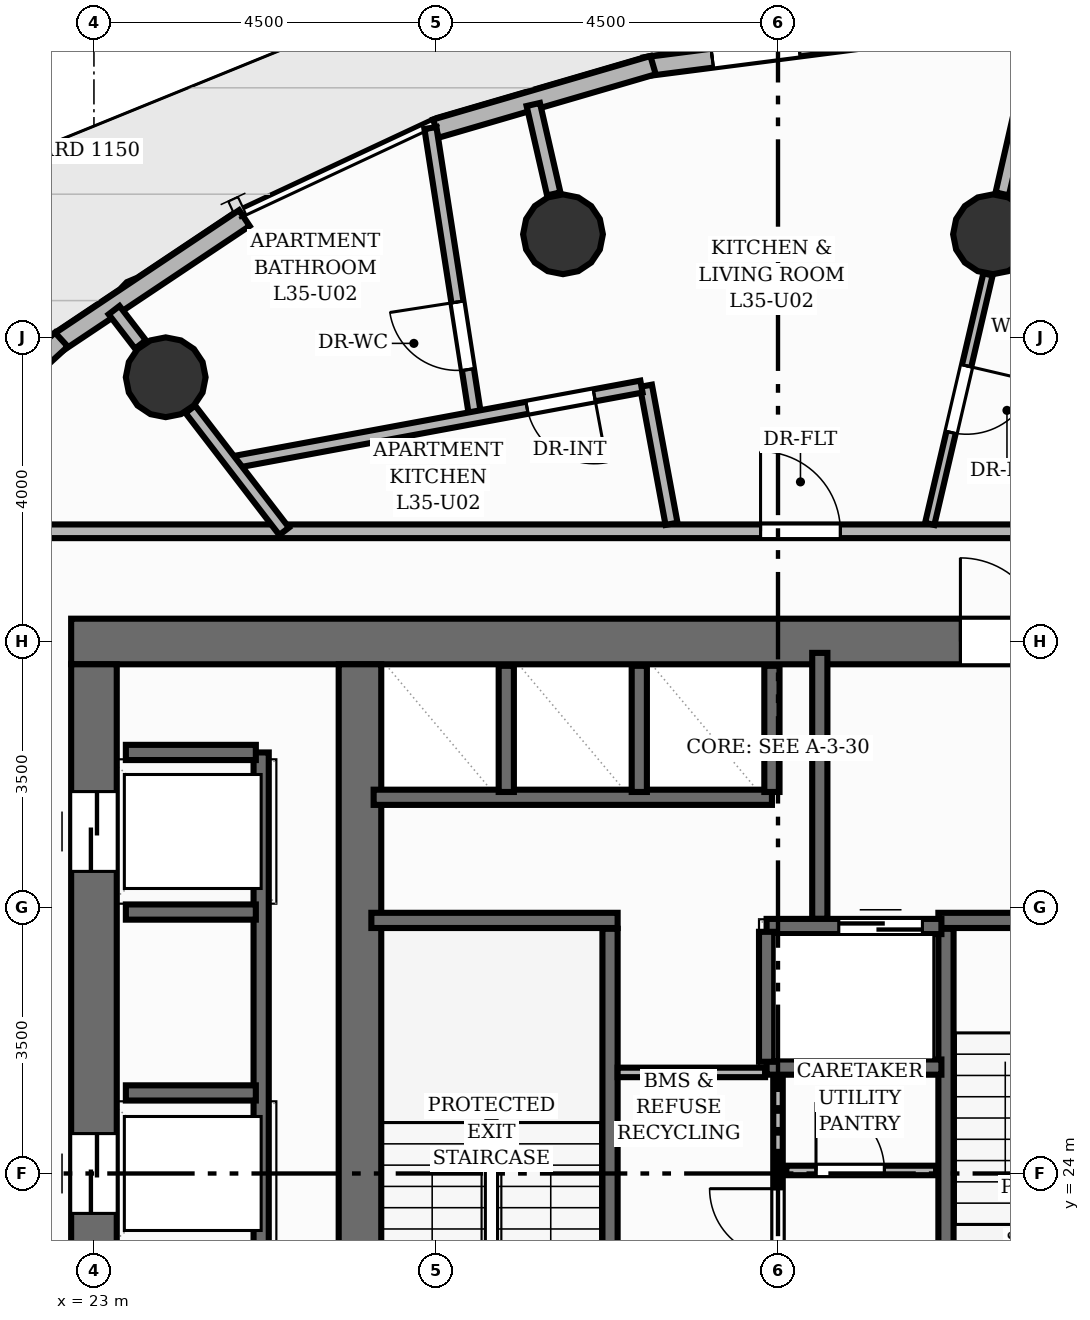
"""IFC4 building model, lengths in metres.
Left out: names, types, materials, properties, quantities, classifications, styles, units other than length and angle.
Written with IfcOpenShell. Run it as: python <this file> out.ifc"""

import sys

from ifc_helpers import new_model, si_unit, direction, frame, frame_2d, origin, origin_2d, place, context, subcontext, project, spatial, rectangle, circle, extrude, element, fill, save


model = new_model("IFC4")
c1 = context("Model", 3, precision=1e-05, world=origin(), true_north=direction((0.0, 1.0)))
c2 = subcontext(c1, "Body", "Model", "MODEL_VIEW")
j1 = project(units=[si_unit("LENGTHUNIT", "METRE"), si_unit("PLANEANGLEUNIT", "RADIAN")], contexts=[c1])
p1 = place(None, origin())
s1 = spatial("IfcSite", under=j1, at=p1, CompositionType="ELEMENT")
p2 = place(p1, origin())
s2 = spatial("IfcBuilding", under=s1, at=p2, CompositionType="ELEMENT")
p3 = place(p2, frame((0.0, 0.0, 120.16)))
s3 = spatial("IfcBuildingStorey", under=s2, at=p3, CompositionType="ELEMENT", Elevation=120.16)
p4 = place(p3, frame((22.7, 31.0, 0.0), z_axis=(0.0, 0.0, 1.0), x_axis=(1.0, 0.0, 0.0)))
e1 = element("IfcWall", 1, at=p4, inside=s3, PredefinedType="SHEAR", context=c2, shape_type="SweptSolid", body=[
    extrude(rectangle(XDim=18.6, YDim=0.6, at=frame_2d((9.3, 0.0))), origin(), (0.0, 0.0, 1.0), 3.2),
])
p5 = place(p4, frame((11.7, 0.0, 0.0)))
e2 = element("IfcOpeningElement", 2, at=p5, cuts=e1, PredefinedType="OPENING", context=c2, shape_type="SweptSolid", body=[
    extrude(rectangle(XDim=1.1, YDim=2.15, at=frame_2d((0.55, 1.075))), frame((0.0, 0.31, 0.0), z_axis=(0.0, -1.0, 0.0), x_axis=(1.0, 0.0, 0.0)), (0.0, 0.0, 1.0), 0.62),
])
p6 = place(p3, frame((23.0, 17.3, 0.0), z_axis=(0.0, 0.0, 1.0), x_axis=(0.0, 1.0, 0.0)))
e3 = element("IfcWall", 3, at=p6, inside=s3, PredefinedType="SHEAR", context=c2, shape_type="SweptSolid", body=[
    extrude(rectangle(XDim=13.4, YDim=0.6, at=frame_2d((6.7, 0.0))), origin(), (0.0, 0.0, 1.0), 3.2),
])
p7 = place(p6, frame((1.675, 0.0, 0.0)))
e4 = element("IfcOpeningElement", 4, at=p7, cuts=e3, PredefinedType="OPENING", context=c2, shape_type="SweptSolid", body=[
    extrude(rectangle(XDim=1.05, YDim=2.15, at=frame_2d((0.525, 1.075))), frame((0.0, 0.31, 0.0), z_axis=(0.0, -1.0, 0.0), x_axis=(1.0, 0.0, 0.0)), (0.0, 0.0, 1.0), 0.62),
])
p8 = place(p6, frame((6.175, 0.0, 0.0)))
e5 = element("IfcOpeningElement", 5, at=p8, cuts=e3, PredefinedType="OPENING", context=c2, shape_type="SweptSolid", body=[
    extrude(rectangle(XDim=1.05, YDim=2.15, at=frame_2d((0.525, 1.075))), frame((0.0, 0.31, 0.0), z_axis=(0.0, -1.0, 0.0), x_axis=(1.0, 0.0, 0.0)), (0.0, 0.0, 1.0), 0.62),
])
p9 = place(p6, frame((10.675, 0.0, 0.0)))
e6 = element("IfcOpeningElement", 6, at=p9, cuts=e3, PredefinedType="OPENING", context=c2, shape_type="SweptSolid", body=[
    extrude(rectangle(XDim=1.05, YDim=2.15, at=frame_2d((0.525, 1.075))), frame((0.0, 0.31, 0.0), z_axis=(0.0, -1.0, 0.0), x_axis=(1.0, 0.0, 0.0)), (0.0, 0.0, 1.0), 0.62),
])
p10 = place(p3, frame((26.5, 17.3, 0.0), z_axis=(0.0, 0.0, 1.0), x_axis=(0.0, 1.0, 0.0)))
e7 = element("IfcWall", 7, at=p10, inside=s3, PredefinedType="SHEAR", context=c2, shape_type="SweptSolid", body=[
    extrude(rectangle(XDim=13.4, YDim=0.56, at=frame_2d((6.7, 0.0))), origin(), (0.0, 0.0, 1.0), 3.2),
])
for number, where, z_axis, x_axis in (
    (8, (34.829, 36.358, 0.0), (0.0, 0.0, 1.0), (1.0, 0.0, 0.0)),
    (9, (29.171, 36.358, 0.0), (0.0, 0.0, 1.0), (1.0, 0.0, 0.0)),
    (10, (23.944, 34.477, 0.0), (0.0, 0.0, 1.0), (1.0, 0.0, 0.0)),
):
    element("IfcColumn", number, at=place(p3, frame(where, z_axis=z_axis, x_axis=x_axis)), inside=s3, PredefinedType="COLUMN", context=c2, shape_type="SweptSolid", body=[
        extrude(circle(Radius=0.525, at=origin_2d()), origin(), (0.0, 0.0, 1.0), 3.2),
    ])
p11 = place(p3, frame((30.25, 38.561, 0.0), z_axis=(0.0, 0.0, 1.0), x_axis=(0.991825107288, 0.1276046886, 0.0)))
e11 = element("IfcWall", 11, at=p11, inside=s3, PredefinedType="SOLIDWALL", context=c2, shape_type="SweptSolid", body=[
    extrude(rectangle(XDim=2.937, YDim=0.25, at=frame_2d((1.468, 0.0))), origin(), (0.0, 0.0, 1.0), 2.96),
])
p12 = place(p11, frame((0.893, 0.0, 0.0)))
e12 = element("IfcOpeningElement", 12, at=p12, cuts=e11, PredefinedType="OPENING", context=c2, shape_type="SweptSolid", body=[
    extrude(rectangle(XDim=1.15, YDim=2.2, at=frame_2d((0.575, 1.1))), frame((0.0, 0.135, 0.0), z_axis=(0.0, -1.0, 0.0), x_axis=(1.0, 0.0, 0.0)), (0.0, 0.0, 1.0), 0.27),
])
p13 = place(p3, frame((27.499, 37.749, 0.0), z_axis=(0.0, 0.0, 1.0), x_axis=(0.95988234126, 0.280403086532, 0.0)))
e13 = element("IfcWall", 13, at=p13, inside=s3, PredefinedType="SOLIDWALL", context=c2, shape_type="SweptSolid", body=[
    extrude(rectangle(XDim=2.977, YDim=0.25, at=frame_2d((1.488, 0.0))), origin(), (0.0, 0.0, 1.0), 2.96),
])
p14 = place(p3, frame((22.486, 34.906, 0.0), z_axis=(0.0, 0.0, 1.0), x_axis=(0.831523781892, 0.555489153943, 0.0)))
e14 = element("IfcWall", 14, at=p14, inside=s3, PredefinedType="SOLIDWALL", context=c2, shape_type="SweptSolid", body=[
    extrude(rectangle(XDim=2.998, YDim=0.25, at=frame_2d((1.499, 0.0))), origin(), (0.0, 0.0, 1.0), 2.96),
])
p15 = place(p3, frame((20.377, 32.961, 0.0), z_axis=(0.0, 0.0, 1.0), x_axis=(0.737072437991, 0.675813747384, 0.0)))
e15 = element("IfcWall", 15, at=p15, inside=s3, PredefinedType="SOLIDWALL", context=c2, shape_type="SweptSolid", body=[
    extrude(rectangle(XDim=2.977, YDim=0.25, at=frame_2d((1.489, 0.0))), origin(), (0.0, 0.0, 1.0), 2.96),
])
p16 = place(p15, frame((0.664, 0.0, 0.85)))
e16 = element("IfcOpeningElement", 16, at=p16, cuts=e15, PredefinedType="OPENING", context=c2, shape_type="SweptSolid", body=[
    extrude(rectangle(XDim=1.65, YDim=1.55, at=frame_2d((0.825, 0.775))), frame((0.0, 0.135, 0.0), z_axis=(0.0, -1.0, 0.0), x_axis=(1.0, 0.0, 0.0)), (0.0, 0.0, 1.0), 0.27),
])
p17 = place(p3, frame((29.79, 20.78, 0.0), z_axis=(0.0, 0.0, 1.0), x_axis=(0.0, 1.0, 0.0)))
e17 = element("IfcWall", 17, at=p17, inside=s3, PredefinedType="SHEAR", context=c2, shape_type="SweptSolid", body=[
    extrude(rectangle(XDim=6.44, YDim=0.2, at=frame_2d((3.22, 0.0))), origin(), (0.0, 0.0, 1.0), 3.2),
])
p18 = place(p3, frame((26.65, 27.33, 0.0), z_axis=(0.0, 0.0, 1.0), x_axis=(1.0, 0.0, 0.0)))
e18 = element("IfcWall", 18, at=p18, inside=s3, PredefinedType="SHEAR", context=c2, shape_type="SweptSolid", body=[
    extrude(rectangle(XDim=3.24, YDim=0.2, at=frame_2d((1.62, 0.0))), origin(), (0.0, 0.0, 1.0), 3.2),
])
p19 = place(p3, frame((34.21, 20.78, 0.0), z_axis=(0.0, 0.0, 1.0), x_axis=(0.0, 1.0, 0.0)))
e19 = element("IfcWall", 19, at=p19, inside=s3, PredefinedType="SHEAR", context=c2, shape_type="SweptSolid", body=[
    extrude(rectangle(XDim=6.44, YDim=0.2, at=frame_2d((3.22, 0.0))), origin(), (0.0, 0.0, 1.0), 3.2),
])
p20 = place(p3, frame((34.11, 27.33, 0.0), z_axis=(0.0, 0.0, 1.0), x_axis=(1.0, 0.0, 0.0)))
e20 = element("IfcWall", 20, at=p20, inside=s3, PredefinedType="SHEAR", context=c2, shape_type="SweptSolid", body=[
    extrude(rectangle(XDim=3.24, YDim=0.2, at=frame_2d((1.62, 0.0))), origin(), (0.0, 0.0, 1.0), 3.2),
])
p21 = place(p20, frame((1.135, 0.0, 0.0)))
e21 = element("IfcOpeningElement", 21, at=p21, cuts=e20, PredefinedType="OPENING", context=c2, shape_type="SweptSolid", body=[
    extrude(rectangle(XDim=1.05, YDim=2.15, at=frame_2d((0.525, 1.075))), frame((0.0, 0.11, 0.0), z_axis=(0.0, -1.0, 0.0), x_axis=(1.0, 0.0, 0.0)), (0.0, 0.0, 1.0), 0.22),
])
p22 = place(p3, frame((32.55, 27.35, 0.0), z_axis=(0.0, 0.0, 1.0), x_axis=(0.0, 1.0, 0.0)))
e22 = element("IfcWall", 22, at=p22, inside=s3, PredefinedType="SHEAR", context=c2, shape_type="SweptSolid", body=[
    extrude(rectangle(XDim=3.5, YDim=0.2, at=frame_2d((1.75, 0.0))), origin(), (0.0, 0.0, 1.0), 3.2),
])
p23 = place(p3, frame((31.85, 27.25, 0.0), z_axis=(0.0, 0.0, 1.0), x_axis=(1.0, 0.0, 0.0)))
e23 = element("IfcWall", 23, at=p23, inside=s3, PredefinedType="SHEAR", context=c2, shape_type="SweptSolid", body=[
    extrude(rectangle(XDim=2.3, YDim=0.2, at=frame_2d((1.15, 0.0))), origin(), (0.0, 0.0, 1.0), 3.2),
])
p24 = place(p23, frame((0.95, 0.0, 0.0)))
e24 = element("IfcOpeningElement", 24, at=p24, cuts=e23, PredefinedType="OPENING", context=c2, shape_type="SweptSolid", body=[
    extrude(rectangle(XDim=1.1, YDim=2.15, at=frame_2d((0.55, 1.075))), frame((0.0, 0.11, 0.0), z_axis=(0.0, -1.0, 0.0), x_axis=(1.0, 0.0, 0.0)), (0.0, 0.0, 1.0), 0.22),
])
p25 = place(p3, frame((31.85, 25.4, 0.0), z_axis=(0.0, 0.0, 1.0), x_axis=(1.0, 0.0, 0.0)))
e25 = element("IfcWall", 25, at=p25, inside=s3, PredefinedType="SHEAR", context=c2, shape_type="SweptSolid", body=[
    extrude(rectangle(XDim=2.3, YDim=0.2, at=frame_2d((1.15, 0.0))), origin(), (0.0, 0.0, 1.0), 3.2),
])
p26 = place(p3, frame((31.85, 25.47, 0.0), z_axis=(0.0, 0.0, 1.0), x_axis=(0.0, 1.0, 0.0)))
e26 = element("IfcWall", 26, at=p26, inside=s3, PredefinedType="SHEAR", context=c2, shape_type="SweptSolid", body=[
    extrude(rectangle(XDim=1.71, YDim=0.2, at=frame_2d((0.855, 0.0))), origin(), (0.0, 0.0, 1.0), 3.2),
])
p27 = place(p3, frame((25.2, 18.46, 0.0), z_axis=(0.0, 0.0, 1.0), x_axis=(0.0, 1.0, 0.0)))
e27 = element("IfcWall", 27, at=p27, inside=s3, PredefinedType="SHEAR", context=c2, shape_type="SweptSolid", body=[
    extrude(rectangle(XDim=11.08, YDim=0.2, at=frame_2d((5.54, 0.0))), origin(), (0.0, 0.0, 1.0), 3.2),
])
for number, where, z_axis, x_axis in (
    (28, (23.42, 29.54, 0.0), (0.0, 0.0, 1.0), (1.0, 0.0, 0.0)),
    (29, (23.42, 25.06, 0.0), (0.0, 0.0, 1.0), (1.0, 0.0, 0.0)),
    (30, (23.42, 27.44, 0.0), (0.0, 0.0, 1.0), (1.0, 0.0, 0.0)),
):
    element("IfcWall", number, at=place(p3, frame(where, z_axis=z_axis, x_axis=x_axis)), inside=s3, PredefinedType="SHEAR", context=c2, shape_type="SweptSolid", body=[
        extrude(rectangle(XDim=1.71, YDim=0.2, at=frame_2d((0.855, 0.0))), origin(), (0.0, 0.0, 1.0), 3.2),
    ])
p28 = place(p3, frame((26.68, 28.95, 0.0), z_axis=(0.0, 0.0, 1.0), x_axis=(1.0, 0.0, 0.0)))
e31 = element("IfcWall", 31, at=p28, inside=s3, PredefinedType="SHEAR", context=c2, shape_type="SweptSolid", body=[
    extrude(rectangle(XDim=5.24, YDim=0.2, at=frame_2d((2.62, 0.0))), origin(), (0.0, 0.0, 1.0), 3.2),
])
for number, where, z_axis, x_axis in (
    (32, (31.92, 29.02, 0.0), (0.0, 0.0, 1.0), (0.0, 1.0, 0.0)),
    (33, (28.425, 29.02, 0.0), (0.0, 0.0, 1.0), (0.0, 1.0, 0.0)),
    (34, (30.175, 29.02, 0.0), (0.0, 0.0, 1.0), (0.0, 1.0, 0.0)),
):
    element("IfcWall", number, at=place(p3, frame(where, z_axis=z_axis, x_axis=x_axis)), inside=s3, PredefinedType="SHEAR", context=c2, shape_type="SweptSolid", body=[
        extrude(rectangle(XDim=1.66, YDim=0.2, at=frame_2d((0.83, 0.0))), origin(), (0.0, 0.0, 1.0), 3.2),
    ])
p29 = place(p3, frame((32.0, 22.72, 0.0), z_axis=(0.0, 0.0, 1.0), x_axis=(0.0, 1.0, 0.0)))
e35 = element("IfcWall", 35, at=p29, inside=s3, PredefinedType="PARTITIONING", context=c2, shape_type="SweptSolid", body=[
    extrude(rectangle(XDim=2.52, YDim=0.125, at=frame_2d((1.26, 0.0))), origin(), (0.0, 0.0, 1.0), 2.955),
])
p30 = place(p29, frame((0.18, 0.0, 0.0)))
e36 = element("IfcOpeningElement", 36, at=p30, cuts=e35, PredefinedType="OPENING", context=c2, shape_type="SweptSolid", body=[
    extrude(rectangle(XDim=0.9, YDim=2.1, at=frame_2d((0.45, 1.05))), frame((0.0, 0.073, 0.0), z_axis=(0.0, -1.0, 0.0), x_axis=(1.0, 0.0, 0.0)), (0.0, 0.0, 1.0), 0.145),
])
p31 = place(p3, frame((32.11, 24.04, 0.0), z_axis=(0.0, 0.0, 1.0), x_axis=(1.0, 0.0, 0.0)))
e37 = element("IfcWall", 37, at=p31, inside=s3, PredefinedType="PARTITIONING", context=c2, shape_type="SweptSolid", body=[
    extrude(rectangle(XDim=1.97, YDim=0.125, at=frame_2d((0.985, 0.0))), origin(), (0.0, 0.0, 1.0), 2.955),
])
p32 = place(p31, frame((0.39, 0.0, 0.0)))
e38 = element("IfcOpeningElement", 38, at=p32, cuts=e37, PredefinedType="OPENING", context=c2, shape_type="SweptSolid", body=[
    extrude(rectangle(XDim=0.9, YDim=2.1, at=frame_2d((0.45, 1.05))), frame((0.0, 0.073, 0.0), z_axis=(0.0, -1.0, 0.0), x_axis=(1.0, 0.0, 0.0)), (0.0, 0.0, 1.0), 0.145),
])
p33 = place(p3, frame((29.89, 25.33, 0.0), z_axis=(0.0, 0.0, 1.0), x_axis=(1.0, 0.0, 0.0)))
e39 = element("IfcWall", 39, at=p33, inside=s3, PredefinedType="PARTITIONING", context=c2, shape_type="SweptSolid", body=[
    extrude(rectangle(XDim=1.94, YDim=0.125, at=frame_2d((0.97, 0.0))), origin(), (0.0, 0.0, 1.0), 2.955),
])
p34 = place(p3, frame((34.95, 36.889, 0.0), z_axis=(0.0, 0.0, 1.0), x_axis=(0.22314653936, 0.97478491062, 0.0)))
e40 = element("IfcWall", 40, at=p34, inside=s3, PredefinedType="PARTITIONING", context=c2, shape_type="SweptSolid", body=[
    extrude(rectangle(XDim=1.957, YDim=0.18, at=frame_2d((0.979, 0.0))), origin(), (0.0, 0.0, 1.0), 2.336),
])
p35 = place(p3, frame((29.05, 36.889, 0.0), z_axis=(0.0, 0.0, 1.0), x_axis=(-0.22307190815, 0.974801992096, 0.0)))
e41 = element("IfcWall", 41, at=p35, inside=s3, PredefinedType="PARTITIONING", context=c2, shape_type="SweptSolid", body=[
    extrude(rectangle(XDim=1.207, YDim=0.18, at=frame_2d((0.604, 0.0))), origin(), (0.0, 0.0, 1.0), 2.336),
])
p36 = place(p3, frame((23.612, 34.908, 0.0), z_axis=(0.0, 0.0, 1.0), x_axis=(-0.609627883901, 0.792687733708, 0.0)))
e42 = element("IfcWall", 42, at=p36, inside=s3, PredefinedType="PARTITIONING", context=c2, shape_type="SweptSolid", body=[
    extrude(rectangle(XDim=0.57, YDim=0.18, at=frame_2d((0.285, 0.0))), origin(), (0.0, 0.0, 1.0), 2.336),
])
p37 = place(p3, frame((21.55, 32.45, 0.0), z_axis=(0.0, 0.0, 1.0), x_axis=(1.0, 0.0, 0.0)))
e43 = element("IfcWall", 43, at=p37, inside=s3, PredefinedType="PARTITIONING", context=c2, shape_type="SweptSolid", body=[
    extrude(rectangle(XDim=20.9, YDim=0.18, at=frame_2d((10.45, 0.0))), origin(), (0.0, 0.0, 1.0), 2.955),
])
p38 = place(p37, frame((10.22, 0.0, 0.0)))
e44 = element("IfcOpeningElement", 44, at=p38, cuts=e43, PredefinedType="OPENING", context=c2, shape_type="SweptSolid", body=[
    extrude(rectangle(XDim=1.05, YDim=2.15, at=frame_2d((0.525, 1.075))), frame((0.0, 0.1, 0.0), z_axis=(0.0, -1.0, 0.0), x_axis=(1.0, 0.0, 0.0)), (0.0, 0.0, 1.0), 0.2),
])
p39 = place(p3, frame((28.018, 33.949, 0.0), z_axis=(0.0, 0.0, 1.0), x_axis=(-0.153476019394, 0.988152372598, 0.0)))
e45 = element("IfcWall", 45, at=p39, inside=s3, PredefinedType="PLUMBINGWALL", context=c2, shape_type="SweptSolid", body=[
    extrude(rectangle(XDim=3.853, YDim=0.16, at=frame_2d((1.926, 0.0))), origin(), (0.0, 0.0, 1.0), 2.692),
])
p40 = place(p39, frame((0.636, 0.0, 0.0)))
e46 = element("IfcOpeningElement", 46, at=p40, cuts=e45, PredefinedType="OPENING", context=c2, shape_type="SweptSolid", body=[
    extrude(rectangle(XDim=0.9, YDim=2.1, at=frame_2d((0.45, 1.05))), frame((0.0, 0.09, 0.0), z_axis=(0.0, -1.0, 0.0), x_axis=(1.0, 0.0, 0.0)), (0.0, 0.0, 1.0), 0.18),
])
p41 = place(p3, frame((34.763, 35.83, 0.0), z_axis=(0.0, 0.0, 1.0), x_axis=(-0.227476864998, -0.973783485119, 0.0)))
e47 = element("IfcWall", 47, at=p41, inside=s3, PredefinedType="PARTITIONING", context=c2, shape_type="SweptSolid", body=[
    extrude(rectangle(XDim=3.371, YDim=0.125, at=frame_2d((1.686, 0.0))), origin(), (0.0, 0.0, 1.0), 2.336),
])
p42 = place(p41, frame((1.236, 0.0, 0.0)))
e48 = element("IfcOpeningElement", 48, at=p42, cuts=e47, PredefinedType="OPENING", context=c2, shape_type="SweptSolid", body=[
    extrude(rectangle(XDim=0.9, YDim=2.1, at=frame_2d((0.45, 1.05))), frame((0.0, 0.073, 0.0), z_axis=(0.0, -1.0, 0.0), x_axis=(1.0, 0.0, 0.0)), (0.0, 0.0, 1.0), 0.145),
])
p43 = place(p3, frame((30.599, 32.548, 0.0), z_axis=(0.0, 0.0, 1.0), x_axis=(-0.182221749535, 0.983257460687, 0.0)))
e49 = element("IfcWall", 49, at=p43, inside=s3, PredefinedType="PLUMBINGWALL", context=c2, shape_type="SweptSolid", body=[
    extrude(rectangle(XDim=1.848, YDim=0.16, at=frame_2d((0.924, 0.0))), origin(), (0.0, 0.0, 1.0), 2.955),
])
p44 = place(p3, frame((30.203, 34.354, 0.0), z_axis=(0.0, 0.0, 1.0), x_axis=(-0.983240381988, -0.182313881064, 0.0)))
e50 = element("IfcWall", 50, at=p44, inside=s3, PredefinedType="PLUMBINGWALL", context=c2, shape_type="SweptSolid", body=[
    extrude(rectangle(XDim=5.488, YDim=0.16, at=frame_2d((2.744, 0.0))), origin(), (0.0, 0.0, 1.0), 2.955),
])
p45 = place(p44, frame((0.631, 0.0, 0.0)))
e51 = element("IfcOpeningElement", 51, at=p45, cuts=e50, PredefinedType="OPENING", context=c2, shape_type="SweptSolid", body=[
    extrude(rectangle(XDim=0.9, YDim=2.1, at=frame_2d((0.45, 1.05))), frame((0.0, 0.09, 0.0), z_axis=(0.0, -1.0, 0.0), x_axis=(1.0, 0.0, 0.0)), (0.0, 0.0, 1.0), 0.18),
])
p46 = place(p3, frame((25.502, 32.45, 0.0), z_axis=(0.0, 0.0, 1.0), x_axis=(-0.609541819787, 0.792753915115, 0.0)))
e52 = element("IfcWall", 52, at=p46, inside=s3, PredefinedType="PLUMBINGWALL", context=c2, shape_type="SweptSolid", body=[
    extrude(rectangle(XDim=2.025, YDim=0.16, at=frame_2d((1.013, 0.0))), origin(), (0.0, 0.0, 1.0), 2.336),
])
p47 = place(p12, origin())
e53 = element("IfcDoor", 53, at=p47, inside=s3, OperationType="SINGLE_SWING_LEFT", PredefinedType="DOOR", context=c2, shape_type="SweptSolid", body=[
    extrude(rectangle(XDim=1.15, YDim=2.2, at=frame_2d((0.575, 1.1))), frame((0.0, 0.025, 0.0), z_axis=(0.0, -1.0, 0.0), x_axis=(1.0, 0.0, 0.0)), (0.0, 0.0, 1.0), 0.05),
])
fill(e12, e53)
p48 = place(p5, origin())
e54 = element("IfcDoor", 54, at=p48, inside=s3, OperationType="SINGLE_SWING_LEFT", PredefinedType="DOOR", context=c2, shape_type="SweptSolid", body=[
    extrude(rectangle(XDim=1.1, YDim=2.15, at=frame_2d((0.55, 1.075))), frame((0.0, 0.025, 0.0), z_axis=(0.0, -1.0, 0.0), x_axis=(1.0, 0.0, 0.0)), (0.0, 0.0, 1.0), 0.05),
])
fill(e2, e54)
p49 = place(p24, origin())
e55 = element("IfcDoor", 55, at=p49, inside=s3, OperationType="DOUBLE_DOOR_SLIDING", PredefinedType="DOOR", context=c2, shape_type="SweptSolid", body=[
    extrude(rectangle(XDim=1.1, YDim=2.15, at=frame_2d((0.55, 1.075))), frame((0.0, 0.025, 0.0), z_axis=(0.0, -1.0, 0.0), x_axis=(1.0, 0.0, 0.0)), (0.0, 0.0, 1.0), 0.05),
])
fill(e24, e55)
p50 = place(p8, origin())
e56 = element("IfcDoor", 56, at=p50, inside=s3, OperationType="DOUBLE_DOOR_SLIDING", PredefinedType="DOOR", context=c2, shape_type="SweptSolid", body=[
    extrude(rectangle(XDim=1.05, YDim=2.15, at=frame_2d((0.525, 1.075))), frame((0.0, 0.025, 0.0), z_axis=(0.0, -1.0, 0.0), x_axis=(1.0, 0.0, 0.0)), (0.0, 0.0, 1.0), 0.05),
])
fill(e5, e56)
p51 = place(p9, origin())
e57 = element("IfcDoor", 57, at=p51, inside=s3, OperationType="DOUBLE_DOOR_SLIDING", PredefinedType="DOOR", context=c2, shape_type="SweptSolid", body=[
    extrude(rectangle(XDim=1.05, YDim=2.15, at=frame_2d((0.525, 1.075))), frame((0.0, 0.025, 0.0), z_axis=(0.0, -1.0, 0.0), x_axis=(1.0, 0.0, 0.0)), (0.0, 0.0, 1.0), 0.05),
])
fill(e6, e57)
p52 = place(p32, origin())
e58 = element("IfcDoor", 58, at=p52, inside=s3, OperationType="SINGLE_SWING_LEFT", PredefinedType="DOOR", context=c2, shape_type="SweptSolid", body=[
    extrude(rectangle(XDim=0.9, YDim=2.1, at=frame_2d((0.45, 1.05))), frame((0.0, 0.025, 0.0), z_axis=(0.0, -1.0, 0.0), x_axis=(1.0, 0.0, 0.0)), (0.0, 0.0, 1.0), 0.05),
])
fill(e38, e58)
p53 = place(p30, origin())
e59 = element("IfcDoor", 59, at=p53, inside=s3, OperationType="SINGLE_SWING_RIGHT", PredefinedType="DOOR", context=c2, shape_type="SweptSolid", body=[
    extrude(rectangle(XDim=0.9, YDim=2.1, at=frame_2d((0.45, 1.05))), frame((0.0, 0.025, 0.0), z_axis=(0.0, -1.0, 0.0), x_axis=(1.0, 0.0, 0.0)), (0.0, 0.0, 1.0), 0.05),
])
fill(e36, e59)
p54 = place(p38, origin())
e60 = element("IfcDoor", 60, at=p54, inside=s3, OperationType="SINGLE_SWING_LEFT", PredefinedType="DOOR", context=c2, shape_type="SweptSolid", body=[
    extrude(rectangle(XDim=1.05, YDim=2.15, at=frame_2d((0.525, 1.075))), frame((0.0, 0.025, 0.0), z_axis=(0.0, -1.0, 0.0), x_axis=(1.0, 0.0, 0.0)), (0.0, 0.0, 1.0), 0.05),
])
fill(e44, e60)
p55 = place(p40, origin())
e61 = element("IfcDoor", 61, at=p55, inside=s3, OperationType="SINGLE_SWING_RIGHT", PredefinedType="DOOR", context=c2, shape_type="SweptSolid", body=[
    extrude(rectangle(XDim=0.9, YDim=2.1, at=frame_2d((0.45, 1.05))), frame((0.0, 0.025, 0.0), z_axis=(0.0, -1.0, 0.0), x_axis=(1.0, 0.0, 0.0)), (0.0, 0.0, 1.0), 0.05),
])
fill(e46, e61)
p56 = place(p42, origin())
e62 = element("IfcDoor", 62, at=p56, inside=s3, OperationType="SINGLE_SWING_LEFT", PredefinedType="DOOR", context=c2, shape_type="SweptSolid", body=[
    extrude(rectangle(XDim=0.9, YDim=2.1, at=frame_2d((0.45, 1.05))), frame((0.0, 0.025, 0.0), z_axis=(0.0, -1.0, 0.0), x_axis=(1.0, 0.0, 0.0)), (0.0, 0.0, 1.0), 0.05),
])
fill(e48, e62)
p57 = place(p45, origin())
e63 = element("IfcDoor", 63, at=p57, inside=s3, OperationType="SINGLE_SWING_LEFT", PredefinedType="DOOR", context=c2, shape_type="SweptSolid", body=[
    extrude(rectangle(XDim=0.9, YDim=2.1, at=frame_2d((0.45, 1.05))), frame((0.0, 0.025, 0.0), z_axis=(0.0, -1.0, 0.0), x_axis=(1.0, 0.0, 0.0)), (0.0, 0.0, 1.0), 0.05),
])
fill(e51, e63)
save(model, sys.argv[1])
